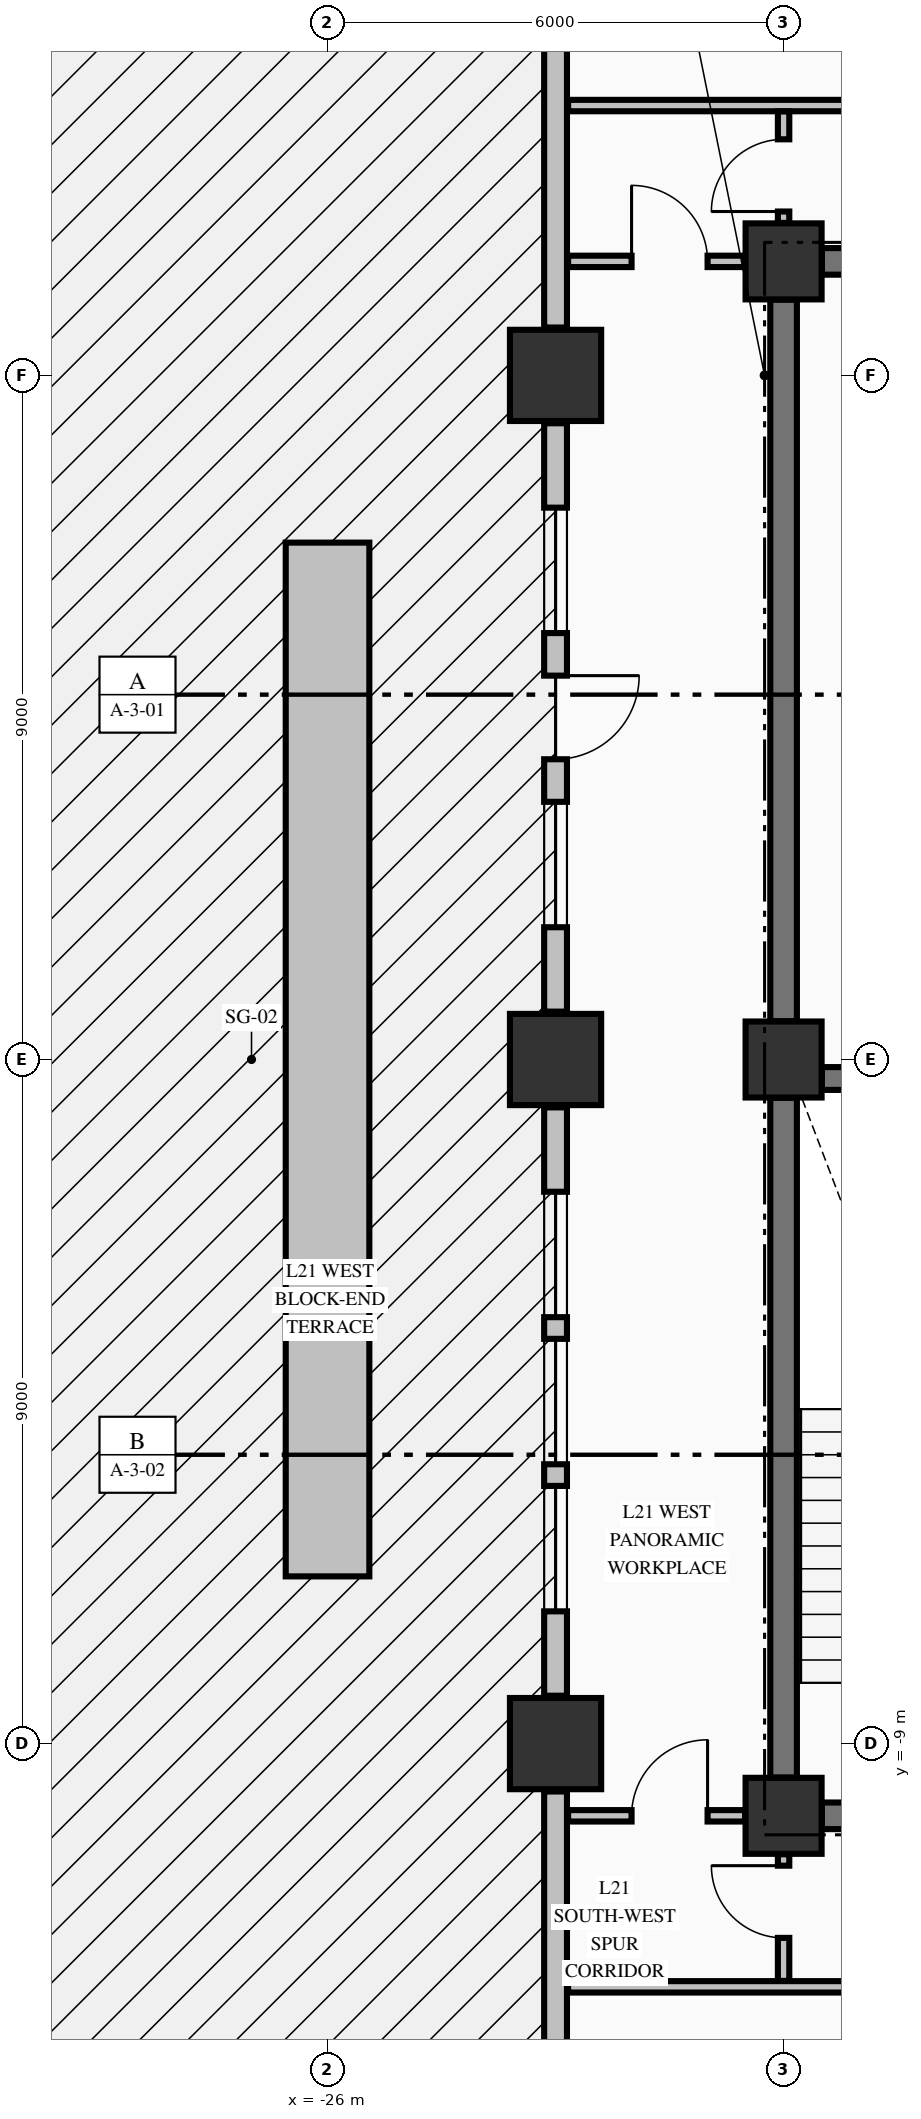
"""IFC4 building model, lengths in metres.
Left out: names, types, materials, properties, quantities, classifications, styles, units other than length and angle.
Written with IfcOpenShell. Run it as: python <this file> out.ifc"""

import sys

from ifc_helpers import new_model, si_unit, direction, frame, frame_2d, origin, origin_2d, place, context, subcontext, project, spatial, rectangle, extrude, element, fill, save


model = new_model("IFC4")
c1 = context("Model", 3, precision=1e-05, world=origin(), true_north=direction((0.0, 1.0)))
c2 = subcontext(c1, "Body", "Model", "MODEL_VIEW")
j1 = project(units=[si_unit("LENGTHUNIT", "METRE"), si_unit("PLANEANGLEUNIT", "RADIAN")], contexts=[c1])
p1 = place(None, origin())
s1 = spatial("IfcSite", under=j1, at=p1, CompositionType="ELEMENT")
p2 = place(p1, origin())
s2 = spatial("IfcBuilding", under=s1, at=p2, CompositionType="ELEMENT")
p3 = place(p2, frame((0.0, 0.0, 86.94)))
s3 = spatial("IfcBuildingStorey", under=s2, at=p3, CompositionType="ELEMENT", Elevation=86.94)
for number, where, z_axis, x_axis in (
    (1, (-23.0, -9.0, -0.425), (0.0, 0.0, 1.0), (1.0, 0.0, 0.0)),
    (2, (-23.0, 0.0, -0.425), (0.0, 0.0, 1.0), (1.0, 0.0, 0.0)),
    (3, (-23.0, 9.0, -0.425), (0.0, 0.0, 1.0), (1.0, 0.0, 0.0)),
):
    element("IfcColumn", number, at=place(p3, frame(where, z_axis=z_axis, x_axis=x_axis)), inside=s3, PredefinedType="COLUMN", context=c2, shape_type="SweptSolid", body=[
        extrude(rectangle(XDim=1.2, YDim=1.2, at=origin_2d()), origin(), (0.0, 0.0, 1.0), 4.595),
    ])
for number, where, z_axis, x_axis in (
    (4, (-20.0, -9.95, -0.425), (0.0, 0.0, 1.0), (1.0, 0.0, 0.0)),
    (5, (-20.0, 10.5, -0.425), (0.0, 0.0, 1.0), (1.0, 0.0, 0.0)),
    (6, (-20.0, 0.0, -0.425), (0.0, 0.0, 1.0), (1.0, 0.0, 0.0)),
):
    element("IfcColumn", number, at=place(p3, frame(where, z_axis=z_axis, x_axis=x_axis)), inside=s3, PredefinedType="COLUMN", context=c2, shape_type="SweptSolid", body=[
        extrude(rectangle(XDim=1.0, YDim=1.0, at=origin_2d()), origin(), (0.0, 0.0, 1.0), 4.595),
    ])
p4 = place(p3, frame((-23.0, -9.63, 0.0), z_axis=(0.0, 0.0, 1.0), x_axis=(0.0, -1.0, 0.0)))
e7 = element("IfcWall", 7, at=p4, inside=s3, PredefinedType="STANDARD", context=c2, shape_type="SweptSolid", body=[
    extrude(rectangle(XDim=10.74, YDim=0.3, at=frame_2d((5.37, 0.0))), origin(), (0.0, 0.0, 1.0), 3.562),
])
p5 = place(p3, frame((-23.0, -0.63, 0.0), z_axis=(0.0, 0.0, 1.0), x_axis=(0.0, -1.0, 0.0)))
e8 = element("IfcWall", 8, at=p5, inside=s3, PredefinedType="STANDARD", context=c2, shape_type="SweptSolid", body=[
    extrude(rectangle(XDim=7.74, YDim=0.3, at=frame_2d((3.87, 0.0))), origin(), (0.0, 0.0, 1.0), 3.562),
])
p6 = place(p5, frame((1.11, 0.0, 0.8)))
e9 = element("IfcOpeningElement", 9, at=p6, cuts=e8, PredefinedType="OPENING", context=c2, shape_type="SweptSolid", body=[
    extrude(rectangle(XDim=1.65, YDim=1.7, at=frame_2d((0.825, 0.85))), frame((0.0, 0.16, 0.0), z_axis=(0.0, -1.0, 0.0), x_axis=(1.0, 0.0, 0.0)), (0.0, 0.0, 1.0), 0.32),
])
p7 = place(p5, frame((3.045, 0.0, 0.8)))
e10 = element("IfcOpeningElement", 10, at=p7, cuts=e8, PredefinedType="OPENING", context=c2, shape_type="SweptSolid", body=[
    extrude(rectangle(XDim=1.65, YDim=1.7, at=frame_2d((0.825, 0.85))), frame((0.0, 0.16, 0.0), z_axis=(0.0, -1.0, 0.0), x_axis=(1.0, 0.0, 0.0)), (0.0, 0.0, 1.0), 0.32),
])
p8 = place(p5, frame((4.98, 0.0, 0.8)))
e11 = element("IfcOpeningElement", 11, at=p8, cuts=e8, PredefinedType="OPENING", context=c2, shape_type="SweptSolid", body=[
    extrude(rectangle(XDim=1.65, YDim=1.7, at=frame_2d((0.825, 0.85))), frame((0.0, 0.16, 0.0), z_axis=(0.0, -1.0, 0.0), x_axis=(1.0, 0.0, 0.0)), (0.0, 0.0, 1.0), 0.32),
])
p9 = place(p3, frame((-23.0, 8.37, 0.0), z_axis=(0.0, 0.0, 1.0), x_axis=(0.0, -1.0, 0.0)))
e12 = element("IfcWall", 12, at=p9, inside=s3, PredefinedType="STANDARD", context=c2, shape_type="SweptSolid", body=[
    extrude(rectangle(XDim=7.74, YDim=0.3, at=frame_2d((3.87, 0.0))), origin(), (0.0, 0.0, 1.0), 3.562),
])
p10 = place(p9, frame((3.32, 0.0, 0.0)))
e13 = element("IfcOpeningElement", 13, at=p10, cuts=e12, PredefinedType="OPENING", context=c2, shape_type="SweptSolid", body=[
    extrude(rectangle(XDim=1.1, YDim=2.15, at=frame_2d((0.55, 1.075))), frame((0.0, 0.16, 0.0), z_axis=(0.0, -1.0, 0.0), x_axis=(1.0, 0.0, 0.0)), (0.0, 0.0, 1.0), 0.32),
])
p11 = place(p9, frame((1.11, 0.0, 0.8)))
e14 = element("IfcOpeningElement", 14, at=p11, cuts=e12, PredefinedType="OPENING", context=c2, shape_type="SweptSolid", body=[
    extrude(rectangle(XDim=1.65, YDim=1.7, at=frame_2d((0.825, 0.85))), frame((0.0, 0.16, 0.0), z_axis=(0.0, -1.0, 0.0), x_axis=(1.0, 0.0, 0.0)), (0.0, 0.0, 1.0), 0.32),
])
p12 = place(p9, frame((4.98, 0.0, 0.8)))
e15 = element("IfcOpeningElement", 15, at=p12, cuts=e12, PredefinedType="OPENING", context=c2, shape_type="SweptSolid", body=[
    extrude(rectangle(XDim=1.65, YDim=1.7, at=frame_2d((0.825, 0.85))), frame((0.0, 0.16, 0.0), z_axis=(0.0, -1.0, 0.0), x_axis=(1.0, 0.0, 0.0)), (0.0, 0.0, 1.0), 0.32),
])
p13 = place(p3, frame((-23.0, 20.37, 0.0), z_axis=(0.0, 0.0, 1.0), x_axis=(0.0, -1.0, 0.0)))
e16 = element("IfcWall", 16, at=p13, inside=s3, PredefinedType="STANDARD", context=c2, shape_type="SweptSolid", body=[
    extrude(rectangle(XDim=10.74, YDim=0.3, at=frame_2d((5.37, 0.0))), origin(), (0.0, 0.0, 1.0), 3.562),
])
p14 = place(p3, frame((-19.496, -9.95, 0.0), z_axis=(0.0, 0.0, 1.0), x_axis=(1.0, 0.0, 0.0)))
e17 = element("IfcWall", 17, at=p14, inside=s3, PredefinedType="SHEAR", context=c2, shape_type="SweptSolid", body=[
    extrude(rectangle(XDim=4.796, YDim=0.35, at=frame_2d((2.398, 0.0))), origin(), (0.0, 0.0, 1.0), 4.17),
])
p15 = place(p14, frame((0.671, 0.0, 0.0)))
e18 = element("IfcOpeningElement", 18, at=p15, cuts=e17, PredefinedType="OPENING", context=c2, shape_type="SweptSolid", body=[
    extrude(rectangle(XDim=1.05, YDim=2.15, at=frame_2d((0.525, 1.075))), frame((0.0, 0.185, 0.0), z_axis=(0.0, -1.0, 0.0), x_axis=(1.0, 0.0, 0.0)), (0.0, 0.0, 1.0), 0.37),
])
p16 = place(p3, frame((-19.496, -0.25, 0.0), z_axis=(0.0, 0.0, 1.0), x_axis=(1.0, 0.0, 0.0)))
e19 = element("IfcWall", 19, at=p16, inside=s3, PredefinedType="SHEAR", context=c2, shape_type="SweptSolid", body=[
    extrude(rectangle(XDim=7.992, YDim=0.3, at=frame_2d((3.996, 0.0))), origin(), (0.0, 0.0, 1.0), 4.17),
])
p17 = place(p16, frame((5.796, 0.0, 0.0)))
e20 = element("IfcOpeningElement", 20, at=p17, cuts=e19, PredefinedType="OPENING", context=c2, shape_type="SweptSolid", body=[
    extrude(rectangle(XDim=1.1, YDim=2.15, at=frame_2d((0.55, 1.075))), frame((0.0, 0.16, 0.0), z_axis=(0.0, -1.0, 0.0), x_axis=(1.0, 0.0, 0.0)), (0.0, 0.0, 1.0), 0.32),
])
p18 = place(p3, frame((-19.496, 10.5, 0.0), z_axis=(0.0, 0.0, 1.0), x_axis=(1.0, 0.0, 0.0)))
e21 = element("IfcWall", 21, at=p18, inside=s3, PredefinedType="SHEAR", context=c2, shape_type="SweptSolid", body=[
    extrude(rectangle(XDim=4.796, YDim=0.35, at=frame_2d((2.398, 0.0))), origin(), (0.0, 0.0, 1.0), 4.17),
])
p19 = place(p18, frame((0.646, 0.0, 0.0)))
e22 = element("IfcOpeningElement", 22, at=p19, cuts=e21, PredefinedType="OPENING", context=c2, shape_type="SweptSolid", body=[
    extrude(rectangle(XDim=0.9, YDim=2.15, at=frame_2d((0.45, 1.075))), frame((0.0, 0.185, 0.0), z_axis=(0.0, -1.0, 0.0), x_axis=(1.0, 0.0, 0.0)), (0.0, 0.0, 1.0), 0.37),
])
p20 = place(p18, frame((3.271, 0.0, 0.0)))
e23 = element("IfcOpeningElement", 23, at=p20, cuts=e21, PredefinedType="OPENING", context=c2, shape_type="SweptSolid", body=[
    extrude(rectangle(XDim=0.95, YDim=2.15, at=frame_2d((0.475, 1.075))), frame((0.0, 0.185, 0.0), z_axis=(0.0, -1.0, 0.0), x_axis=(1.0, 0.0, 0.0)), (0.0, 0.0, 1.0), 0.37),
])
p21 = place(p3, frame((-22.835, -12.2, 0.0), z_axis=(0.0, 0.0, 1.0), x_axis=(1.0, 0.0, 0.0)))
e24 = element("IfcWall", 24, at=p21, inside=s3, PredefinedType="PARTITIONING", context=c2, shape_type="SweptSolid", body=[
    extrude(rectangle(XDim=50.67, YDim=0.15, at=frame_2d((25.335, 0.0))), origin(), (0.0, 0.0, 1.0), 4.17),
])
p22 = place(p21, frame((9.26, 0.0, 0.0)))
e25 = element("IfcOpeningElement", 25, at=p22, cuts=e24, PredefinedType="OPENING", context=c2, shape_type="SweptSolid", body=[
    extrude(rectangle(XDim=1.05, YDim=2.15, at=frame_2d((0.525, 1.075))), frame((0.0, 0.085, 0.0), z_axis=(0.0, -1.0, 0.0), x_axis=(1.0, 0.0, 0.0)), (0.0, 0.0, 1.0), 0.17),
])
p23 = place(p21, frame((19.31, 0.0, 0.0)))
e26 = element("IfcOpeningElement", 26, at=p23, cuts=e24, PredefinedType="OPENING", context=c2, shape_type="SweptSolid", body=[
    extrude(rectangle(XDim=1.05, YDim=2.15, at=frame_2d((0.525, 1.075))), frame((0.0, 0.085, 0.0), z_axis=(0.0, -1.0, 0.0), x_axis=(1.0, 0.0, 0.0)), (0.0, 0.0, 1.0), 0.17),
])
p24 = place(p21, frame((27.36, 0.0, 0.0)))
e27 = element("IfcOpeningElement", 27, at=p24, cuts=e24, PredefinedType="OPENING", context=c2, shape_type="SweptSolid", body=[
    extrude(rectangle(XDim=0.95, YDim=2.15, at=frame_2d((0.475, 1.075))), frame((0.0, 0.085, 0.0), z_axis=(0.0, -1.0, 0.0), x_axis=(1.0, 0.0, 0.0)), (0.0, 0.0, 1.0), 0.17),
])
p25 = place(p21, frame((32.41, 0.0, 0.0)))
e28 = element("IfcOpeningElement", 28, at=p25, cuts=e24, PredefinedType="OPENING", context=c2, shape_type="SweptSolid", body=[
    extrude(rectangle(XDim=0.95, YDim=2.15, at=frame_2d((0.475, 1.075))), frame((0.0, 0.085, 0.0), z_axis=(0.0, -1.0, 0.0), x_axis=(1.0, 0.0, 0.0)), (0.0, 0.0, 1.0), 0.17),
])
p26 = place(p21, frame((39.41, 0.0, 0.0)))
e29 = element("IfcOpeningElement", 29, at=p26, cuts=e24, PredefinedType="OPENING", context=c2, shape_type="SweptSolid", body=[
    extrude(rectangle(XDim=1.05, YDim=2.15, at=frame_2d((0.525, 1.075))), frame((0.0, 0.085, 0.0), z_axis=(0.0, -1.0, 0.0), x_axis=(1.0, 0.0, 0.0)), (0.0, 0.0, 1.0), 0.17),
])
p27 = place(p3, frame((-22.835, -9.95, 0.0), z_axis=(0.0, 0.0, 1.0), x_axis=(1.0, 0.0, 0.0)))
e30 = element("IfcWall", 30, at=p27, inside=s3, PredefinedType="PARTITIONING", context=c2, shape_type="SweptSolid", body=[
    extrude(rectangle(XDim=2.329, YDim=0.15, at=frame_2d((1.165, 0.0))), origin(), (0.0, 0.0, 1.0), 4.17),
])
p28 = place(p27, frame((0.835, 0.0, 0.0)))
e31 = element("IfcOpeningElement", 31, at=p28, cuts=e30, PredefinedType="OPENING", context=c2, shape_type="SweptSolid", body=[
    extrude(rectangle(XDim=1.0, YDim=2.15, at=frame_2d((0.5, 1.075))), frame((0.0, 0.085, 0.0), z_axis=(0.0, -1.0, 0.0), x_axis=(1.0, 0.0, 0.0)), (0.0, 0.0, 1.0), 0.17),
])
p29 = place(p3, frame((-22.835, 10.5, 0.0), z_axis=(0.0, 0.0, 1.0), x_axis=(1.0, 0.0, 0.0)))
e32 = element("IfcWall", 32, at=p29, inside=s3, PredefinedType="PARTITIONING", context=c2, shape_type="SweptSolid", body=[
    extrude(rectangle(XDim=2.329, YDim=0.15, at=frame_2d((1.165, 0.0))), origin(), (0.0, 0.0, 1.0), 4.17),
])
p30 = place(p29, frame((0.835, 0.0, 0.0)))
e33 = element("IfcOpeningElement", 33, at=p30, cuts=e32, PredefinedType="OPENING", context=c2, shape_type="SweptSolid", body=[
    extrude(rectangle(XDim=1.0, YDim=2.15, at=frame_2d((0.5, 1.075))), frame((0.0, 0.085, 0.0), z_axis=(0.0, -1.0, 0.0), x_axis=(1.0, 0.0, 0.0)), (0.0, 0.0, 1.0), 0.17),
])
p31 = place(p3, frame((-22.835, 12.55, 0.0), z_axis=(0.0, 0.0, 1.0), x_axis=(1.0, 0.0, 0.0)))
e34 = element("IfcWall", 34, at=p31, inside=s3, PredefinedType="PARTITIONING", context=c2, shape_type="SweptSolid", body=[
    extrude(rectangle(XDim=50.67, YDim=0.15, at=frame_2d((25.335, 0.0))), origin(), (0.0, 0.0, 1.0), 4.17),
])
p32 = place(p31, frame((8.93, 0.0, 0.0)))
e35 = element("IfcOpeningElement", 35, at=p32, cuts=e34, PredefinedType="OPENING", context=c2, shape_type="SweptSolid", body=[
    extrude(rectangle(XDim=1.05, YDim=2.15, at=frame_2d((0.525, 1.075))), frame((0.0, 0.085, 0.0), z_axis=(0.0, -1.0, 0.0), x_axis=(1.0, 0.0, 0.0)), (0.0, 0.0, 1.0), 0.17),
])
p33 = place(p31, frame((18.66, 0.0, 0.0)))
e36 = element("IfcOpeningElement", 36, at=p33, cuts=e34, PredefinedType="OPENING", context=c2, shape_type="SweptSolid", body=[
    extrude(rectangle(XDim=1.05, YDim=2.15, at=frame_2d((0.525, 1.075))), frame((0.0, 0.085, 0.0), z_axis=(0.0, -1.0, 0.0), x_axis=(1.0, 0.0, 0.0)), (0.0, 0.0, 1.0), 0.17),
])
p34 = place(p31, frame((26.71, 0.0, 0.0)))
e37 = element("IfcOpeningElement", 37, at=p34, cuts=e34, PredefinedType="OPENING", context=c2, shape_type="SweptSolid", body=[
    extrude(rectangle(XDim=0.95, YDim=2.15, at=frame_2d((0.475, 1.075))), frame((0.0, 0.085, 0.0), z_axis=(0.0, -1.0, 0.0), x_axis=(1.0, 0.0, 0.0)), (0.0, 0.0, 1.0), 0.17),
])
p35 = place(p31, frame((34.46, 0.0, 0.0)))
e38 = element("IfcOpeningElement", 38, at=p35, cuts=e34, PredefinedType="OPENING", context=c2, shape_type="SweptSolid", body=[
    extrude(rectangle(XDim=0.95, YDim=2.15, at=frame_2d((0.475, 1.075))), frame((0.0, 0.085, 0.0), z_axis=(0.0, -1.0, 0.0), x_axis=(1.0, 0.0, 0.0)), (0.0, 0.0, 1.0), 0.17),
])
p36 = place(p31, frame((39.08, 0.0, 0.0)))
e39 = element("IfcOpeningElement", 39, at=p36, cuts=e34, PredefinedType="OPENING", context=c2, shape_type="SweptSolid", body=[
    extrude(rectangle(XDim=1.05, YDim=2.15, at=frame_2d((0.525, 1.075))), frame((0.0, 0.085, 0.0), z_axis=(0.0, -1.0, 0.0), x_axis=(1.0, 0.0, 0.0)), (0.0, 0.0, 1.0), 0.17),
])
p37 = place(p3, frame((-20.0, -9.446, 0.0), z_axis=(0.0, 0.0, 1.0), x_axis=(0.0, 1.0, 0.0)))
e40 = element("IfcWall", 40, at=p37, inside=s3, PredefinedType="SHEAR", context=c2, shape_type="SweptSolid", body=[
    extrude(rectangle(XDim=8.942, YDim=0.35, at=frame_2d((4.471, 0.0))), origin(), (0.0, 0.0, 1.0), 4.17),
])
p38 = place(p3, frame((-20.0, 0.504, 0.0), z_axis=(0.0, 0.0, 1.0), x_axis=(0.0, 1.0, 0.0)))
e41 = element("IfcWall", 41, at=p38, inside=s3, PredefinedType="SHEAR", context=c2, shape_type="SweptSolid", body=[
    extrude(rectangle(XDim=9.492, YDim=0.35, at=frame_2d((4.746, 0.0))), origin(), (0.0, 0.0, 1.0), 4.17),
])
p39 = place(p3, frame((-20.0, -12.122, 0.0), z_axis=(0.0, 0.0, 1.0), x_axis=(0.0, 1.0, 0.0)))
e42 = element("IfcWall", 42, at=p39, inside=s3, PredefinedType="PARTITIONING", context=c2, shape_type="SweptSolid", body=[
    extrude(rectangle(XDim=1.666, YDim=0.15, at=frame_2d((0.833, 0.0))), origin(), (0.0, 0.0, 1.0), 3.36),
])
p40 = place(p39, frame((0.566, 0.0, 0.0)))
e43 = element("IfcOpeningElement", 43, at=p40, cuts=e42, PredefinedType="OPENING", context=c2, shape_type="SweptSolid", body=[
    extrude(rectangle(XDim=0.95, YDim=2.15, at=frame_2d((0.475, 1.075))), frame((0.0, 0.085, 0.0), z_axis=(0.0, -1.0, 0.0), x_axis=(1.0, 0.0, 0.0)), (0.0, 0.0, 1.0), 0.17),
])
p41 = place(p3, frame((-20.0, 11.006, 0.0), z_axis=(0.0, 0.0, 1.0), x_axis=(0.0, 1.0, 0.0)))
e44 = element("IfcWall", 44, at=p41, inside=s3, PredefinedType="PARTITIONING", context=c2, shape_type="SweptSolid", body=[
    extrude(rectangle(XDim=1.466, YDim=0.15, at=frame_2d((0.733, 0.0))), origin(), (0.0, 0.0, 1.0), 3.36),
])
p42 = place(p41, frame((0.15, 0.0, 0.0)))
e45 = element("IfcOpeningElement", 45, at=p42, cuts=e44, PredefinedType="OPENING", context=c2, shape_type="SweptSolid", body=[
    extrude(rectangle(XDim=0.95, YDim=2.15, at=frame_2d((0.475, 1.075))), frame((0.0, 0.085, 0.0), z_axis=(0.0, -1.0, 0.0), x_axis=(1.0, 0.0, 0.0)), (0.0, 0.0, 1.0), 0.17),
])
p43 = place(p3, frame((-26.0, -6.8, -0.04), z_axis=(0.0, 0.0, 1.0), x_axis=(0.0, 1.0, 0.0)))
e46 = element("IfcWall", 46, at=p43, inside=s3, PredefinedType="PARAPET", context=c2, shape_type="SweptSolid", body=[
    extrude(rectangle(XDim=13.6, YDim=1.1, at=frame_2d((6.8, 0.0))), origin(), (0.0, 0.0, 1.0), 0.6),
])
p44 = place(p6, origin())
e47 = element("IfcWindow", 47, at=p44, inside=s3, PartitioningType="SINGLE_PANEL", PredefinedType="WINDOW", context=c2, shape_type="SweptSolid", body=[
    extrude(rectangle(XDim=1.65, YDim=1.7, at=frame_2d((0.825, 0.85))), frame((0.0, 0.03, 0.0), z_axis=(0.0, -1.0, 0.0), x_axis=(1.0, 0.0, 0.0)), (0.0, 0.0, 1.0), 0.06),
])
fill(e9, e47)
p45 = place(p7, origin())
e48 = element("IfcWindow", 48, at=p45, inside=s3, PartitioningType="SINGLE_PANEL", PredefinedType="WINDOW", context=c2, shape_type="SweptSolid", body=[
    extrude(rectangle(XDim=1.65, YDim=1.7, at=frame_2d((0.825, 0.85))), frame((0.0, 0.03, 0.0), z_axis=(0.0, -1.0, 0.0), x_axis=(1.0, 0.0, 0.0)), (0.0, 0.0, 1.0), 0.06),
])
fill(e10, e48)
p46 = place(p8, origin())
e49 = element("IfcWindow", 49, at=p46, inside=s3, PartitioningType="SINGLE_PANEL", PredefinedType="WINDOW", context=c2, shape_type="SweptSolid", body=[
    extrude(rectangle(XDim=1.65, YDim=1.7, at=frame_2d((0.825, 0.85))), frame((0.0, 0.03, 0.0), z_axis=(0.0, -1.0, 0.0), x_axis=(1.0, 0.0, 0.0)), (0.0, 0.0, 1.0), 0.06),
])
fill(e11, e49)
p47 = place(p10, origin())
e50 = element("IfcDoor", 50, at=p47, inside=s3, OperationType="SINGLE_SWING_LEFT", PredefinedType="DOOR", context=c2, shape_type="SweptSolid", body=[
    extrude(rectangle(XDim=1.1, YDim=2.15, at=frame_2d((0.55, 1.075))), frame((0.0, 0.025, 0.0), z_axis=(0.0, -1.0, 0.0), x_axis=(1.0, 0.0, 0.0)), (0.0, 0.0, 1.0), 0.05),
])
fill(e13, e50)
p48 = place(p11, origin())
e51 = element("IfcWindow", 51, at=p48, inside=s3, PartitioningType="SINGLE_PANEL", PredefinedType="WINDOW", context=c2, shape_type="SweptSolid", body=[
    extrude(rectangle(XDim=1.65, YDim=1.7, at=frame_2d((0.825, 0.85))), frame((0.0, 0.03, 0.0), z_axis=(0.0, -1.0, 0.0), x_axis=(1.0, 0.0, 0.0)), (0.0, 0.0, 1.0), 0.06),
])
fill(e14, e51)
p49 = place(p12, origin())
e52 = element("IfcWindow", 52, at=p49, inside=s3, PartitioningType="SINGLE_PANEL", PredefinedType="WINDOW", context=c2, shape_type="SweptSolid", body=[
    extrude(rectangle(XDim=1.65, YDim=1.7, at=frame_2d((0.825, 0.85))), frame((0.0, 0.03, 0.0), z_axis=(0.0, -1.0, 0.0), x_axis=(1.0, 0.0, 0.0)), (0.0, 0.0, 1.0), 0.06),
])
fill(e15, e52)
p50 = place(p42, origin())
e53 = element("IfcDoor", 53, at=p50, inside=s3, OperationType="SINGLE_SWING_LEFT", PredefinedType="DOOR", context=c2, shape_type="SweptSolid", body=[
    extrude(rectangle(XDim=0.95, YDim=2.15, at=frame_2d((0.475, 1.075))), frame((0.0, 0.025, 0.0), z_axis=(0.0, -1.0, 0.0), x_axis=(1.0, 0.0, 0.0)), (0.0, 0.0, 1.0), 0.05),
])
fill(e45, e53)
p51 = place(p40, origin())
e54 = element("IfcDoor", 54, at=p51, inside=s3, OperationType="SINGLE_SWING_RIGHT", PredefinedType="DOOR", context=c2, shape_type="SweptSolid", body=[
    extrude(rectangle(XDim=0.95, YDim=2.15, at=frame_2d((0.475, 1.075))), frame((0.0, 0.025, 0.0), z_axis=(0.0, -1.0, 0.0), x_axis=(1.0, 0.0, 0.0)), (0.0, 0.0, 1.0), 0.05),
])
fill(e43, e54)
p52 = place(p30, origin())
e55 = element("IfcDoor", 55, at=p52, inside=s3, OperationType="SINGLE_SWING_LEFT", PredefinedType="DOOR", context=c2, shape_type="SweptSolid", body=[
    extrude(rectangle(XDim=1.0, YDim=2.15, at=frame_2d((0.5, 1.075))), frame((0.0, 0.025, 0.0), z_axis=(0.0, -1.0, 0.0), x_axis=(1.0, 0.0, 0.0)), (0.0, 0.0, 1.0), 0.05),
])
fill(e33, e55)
p53 = place(p28, origin())
e56 = element("IfcDoor", 56, at=p53, inside=s3, OperationType="SINGLE_SWING_RIGHT", PredefinedType="DOOR", context=c2, shape_type="SweptSolid", body=[
    extrude(rectangle(XDim=1.0, YDim=2.15, at=frame_2d((0.5, 1.075))), frame((0.0, 0.025, 0.0), z_axis=(0.0, -1.0, 0.0), x_axis=(1.0, 0.0, 0.0)), (0.0, 0.0, 1.0), 0.05),
])
fill(e31, e56)
save(model, sys.argv[1])
